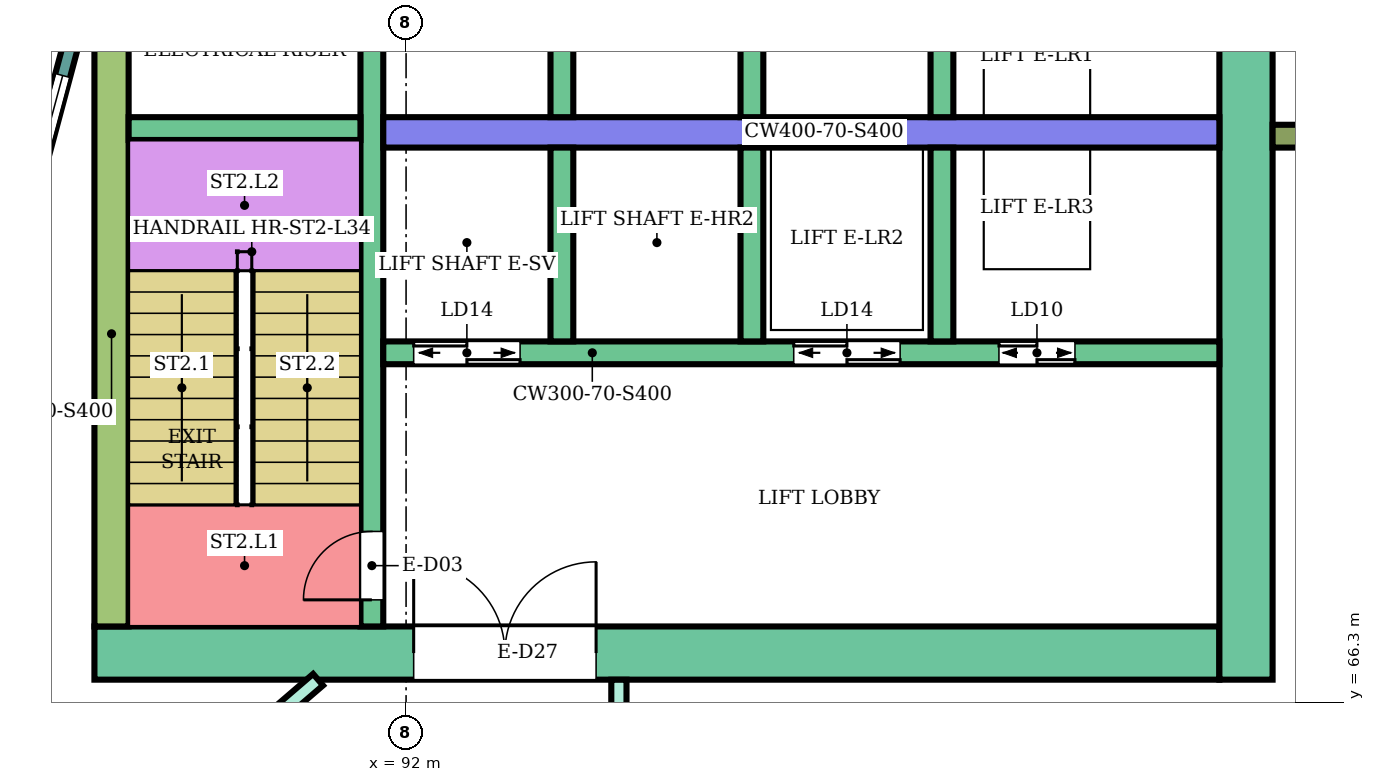
"""IFC4 building model, lengths in metres.
Left out: names, types, materials, properties, quantities, classifications, styles, units other than length and angle.
Written with IfcOpenShell. Run it as: python <this file> out.ifc"""

import sys

from ifc_helpers import new_model, si_unit, direction, frame, frame_2d, origin, place, context, subcontext, project, spatial, rectangle, extrude, element, fill, save


model = new_model("IFC4")
c1 = context("Model", 3, precision=1e-05, world=origin(), true_north=direction((0.0, 1.0)))
c2 = subcontext(c1, "Body", "Model", "MODEL_VIEW")
j1 = project(units=[si_unit("LENGTHUNIT", "METRE"), si_unit("PLANEANGLEUNIT", "RADIAN")], contexts=[c1])
p1 = place(None, origin())
s1 = spatial("IfcSite", under=j1, at=p1, CompositionType="ELEMENT")
p2 = place(p1, origin())
s2 = spatial("IfcBuilding", under=s1, at=p2, CompositionType="ELEMENT")
p3 = place(p2, frame((0.0, 0.0, 145.8)))
s3 = spatial("IfcBuildingStorey", under=s2, at=p3, CompositionType="ELEMENT", Elevation=145.8)
p4 = place(p3, frame((87.9, 66.95, 0.0), z_axis=(0.0, 0.0, 1.0), x_axis=(1.0, 0.0, 0.0)))
e1 = element("IfcWall", 1, at=p4, inside=s3, PredefinedType="SHEAR", context=c2, shape_type="SweptSolid", body=[
    extrude(rectangle(XDim=14.8, YDim=0.7, at=frame_2d((7.4, 0.0))), origin(), (0.0, 0.0, 1.0), 3.5),
])
p5 = place(p4, frame((4.2, 0.0, 0.0)))
e2 = element("IfcOpeningElement", 2, at=p5, cuts=e1, PredefinedType="OPENING", context=c2, shape_type="SweptSolid", body=[
    extrude(rectangle(XDim=2.4, YDim=2.4, at=frame_2d((1.2, 1.2))), frame((0.0, 0.36, 0.0), z_axis=(0.0, -1.0, 0.0), x_axis=(1.0, 0.0, 0.0)), (0.0, 0.0, 1.0), 0.72),
])
p6 = place(p3, frame((88.125, 67.3, 0.0), z_axis=(0.0, 0.0, 1.0), x_axis=(0.0, 1.0, 0.0)))
e3 = element("IfcWall", 3, at=p6, inside=s3, PredefinedType="SHEAR", context=c2, shape_type="SweptSolid", body=[
    extrude(rectangle(XDim=7.7, YDim=0.45, at=frame_2d((3.85, 0.0))), origin(), (0.0, 0.0, 1.0), 3.5),
])
p7 = place(p3, frame((103.05, 66.6, 0.0), z_axis=(0.0, 0.0, 1.0), x_axis=(0.0, 1.0, 0.0)))
e4 = element("IfcWall", 4, at=p7, inside=s3, PredefinedType="SHEAR", context=c2, shape_type="SweptSolid", body=[
    extrude(rectangle(XDim=16.8, YDim=0.7, at=frame_2d((8.4, 0.0))), origin(), (0.0, 0.0, 1.0), 3.5),
])
p8 = place(p3, frame((91.55, 67.3, 0.0), z_axis=(0.0, 0.0, 1.0), x_axis=(0.0, 1.0, 0.0)))
e5 = element("IfcWall", 5, at=p8, inside=s3, PredefinedType="SHEAR", context=c2, shape_type="SweptSolid", body=[
    extrude(rectangle(XDim=7.7, YDim=0.3, at=frame_2d((3.85, 0.0))), origin(), (0.0, 0.0, 1.0), 3.5),
])
p9 = place(p8, frame((0.35, 0.0, 0.0)))
e6 = element("IfcOpeningElement", 6, at=p9, cuts=e5, PredefinedType="OPENING", context=c2, shape_type="SweptSolid", body=[
    extrude(rectangle(XDim=0.9, YDim=2.1, at=frame_2d((0.45, 1.05))), frame((0.0, 0.16, 0.0), z_axis=(0.0, -1.0, 0.0), x_axis=(1.0, 0.0, 0.0)), (0.0, 0.0, 1.0), 0.32),
])
p10 = place(p3, frame((88.35, 73.85, 0.0), z_axis=(0.0, 0.0, 1.0), x_axis=(1.0, 0.0, 0.0)))
e7 = element("IfcWall", 7, at=p10, inside=s3, PredefinedType="SHEAR", context=c2, shape_type="SweptSolid", body=[
    extrude(rectangle(XDim=3.05, YDim=0.3, at=frame_2d((1.525, 0.0))), origin(), (0.0, 0.0, 1.0), 3.5),
])
p11 = place(p3, frame((91.7, 73.8, 0.0), z_axis=(0.0, 0.0, 1.0), x_axis=(1.0, 0.0, 0.0)))
e8 = element("IfcWall", 8, at=p11, inside=s3, PredefinedType="SHEAR", context=c2, shape_type="SweptSolid", body=[
    extrude(rectangle(XDim=11.0, YDim=0.4, at=frame_2d((5.5, 0.0))), origin(), (0.0, 0.0, 1.0), 3.5),
])
p12 = place(p3, frame((91.7, 70.9, 0.0), z_axis=(0.0, 0.0, 1.0), x_axis=(1.0, 0.0, 0.0)))
e9 = element("IfcWall", 9, at=p12, inside=s3, PredefinedType="SHEAR", context=c2, shape_type="SweptSolid", body=[
    extrude(rectangle(XDim=11.0, YDim=0.3, at=frame_2d((5.5, 0.0))), origin(), (0.0, 0.0, 1.0), 3.5),
])
p13 = place(p12, frame((0.4, 0.0, 0.0)))
e10 = element("IfcOpeningElement", 10, at=p13, cuts=e9, PredefinedType="OPENING", context=c2, shape_type="SweptSolid", body=[
    extrude(rectangle(XDim=1.4, YDim=2.1, at=frame_2d((0.7, 1.05))), frame((0.0, 0.16, 0.0), z_axis=(0.0, -1.0, 0.0), x_axis=(1.0, 0.0, 0.0)), (0.0, 0.0, 1.0), 0.32),
])
p14 = place(p12, frame((5.4, 0.0, 0.0)))
e11 = element("IfcOpeningElement", 11, at=p14, cuts=e9, PredefinedType="OPENING", context=c2, shape_type="SweptSolid", body=[
    extrude(rectangle(XDim=1.4, YDim=2.1, at=frame_2d((0.7, 1.05))), frame((0.0, 0.16, 0.0), z_axis=(0.0, -1.0, 0.0), x_axis=(1.0, 0.0, 0.0)), (0.0, 0.0, 1.0), 0.32),
])
p15 = place(p12, frame((8.1, 0.0, 0.0)))
e12 = element("IfcOpeningElement", 12, at=p15, cuts=e9, PredefinedType="OPENING", context=c2, shape_type="SweptSolid", body=[
    extrude(rectangle(XDim=1.0, YDim=2.1, at=frame_2d((0.5, 1.05))), frame((0.0, 0.16, 0.0), z_axis=(0.0, -1.0, 0.0), x_axis=(1.0, 0.0, 0.0)), (0.0, 0.0, 1.0), 0.32),
])
for number, where, z_axis, x_axis in (
    (13, (94.05, 74.0, 0.0), (0.0, 0.0, 1.0), (0.0, 1.0, 0.0)),
    (14, (96.55, 74.0, 0.0), (0.0, 0.0, 1.0), (0.0, 1.0, 0.0)),
    (15, (99.05, 74.0, 0.0), (0.0, 0.0, 1.0), (0.0, 1.0, 0.0)),
    (16, (94.05, 71.05, 0.0), (0.0, 0.0, 1.0), (0.0, 1.0, 0.0)),
    (17, (96.55, 71.05, 0.0), (0.0, 0.0, 1.0), (0.0, 1.0, 0.0)),
    (18, (99.05, 71.05, 0.0), (0.0, 0.0, 1.0), (0.0, 1.0, 0.0)),
):
    element("IfcWall", number, at=place(p3, frame(where, z_axis=z_axis, x_axis=x_axis)), inside=s3, PredefinedType="SHEAR", context=c2, shape_type="SweptSolid", body=[
        extrude(rectangle(XDim=2.55, YDim=0.3, at=frame_2d((1.275, 0.0))), origin(), (0.0, 0.0, 1.0), 3.5),
    ])
p16 = place(p3, frame((103.4, 73.75, 0.0), z_axis=(0.0, 0.0, 1.0), x_axis=(1.0, 0.0, 0.0)))
e19 = element("IfcWall", 19, at=p16, inside=s3, PredefinedType="NOTDEFINED", context=c2, shape_type="SweptSolid", body=[
    extrude(rectangle(XDim=2.416, YDim=0.3, at=frame_2d((1.208, 0.0))), origin(), (0.0, 0.0, 1.0), 3.9),
])
p17 = place(p3, frame((86.585, 71.198, 0.0), z_axis=(0.0, 0.0, 1.0), x_axis=(0.258789828301, 0.965933654434, 0.0)))
e20 = element("IfcWall", 20, at=p17, inside=s3, PredefinedType="NOTDEFINED", context=c2, shape_type="SweptSolid", body=[
    extrude(rectangle(XDim=3.936, YDim=0.2, at=frame_2d((1.968, 0.0))), origin(), (0.0, 0.0, 1.0), 3.9),
])
p18 = place(p17, frame((0.468, 0.0, 0.9)))
e21 = element("IfcOpeningElement", 21, at=p18, cuts=e20, PredefinedType="OPENING", context=c2, shape_type="SweptSolid", body=[
    extrude(rectangle(XDim=3.0, YDim=2.3, at=frame_2d((1.5, 1.15))), frame((0.0, 0.11, 0.0), z_axis=(0.0, -1.0, 0.0), x_axis=(1.0, 0.0, 0.0)), (0.0, 0.0, 1.0), 0.22),
])
p19 = place(p3, frame((86.877, 63.189, 0.0), z_axis=(0.0, 0.0, 1.0), x_axis=(0.758164888471, 0.652062881853, 0.0)))
e22 = element("IfcWall", 22, at=p19, inside=s3, PredefinedType="PARTITIONING", context=c2, shape_type="SweptSolid", body=[
    extrude(rectangle(XDim=5.23, YDim=0.2, at=frame_2d((2.615, 0.0))), origin(), (0.0, 0.0, 1.0), 3.45),
])
p20 = place(p19, frame((2.63, 0.0, 0.0)))
e23 = element("IfcOpeningElement", 23, at=p20, cuts=e22, PredefinedType="OPENING", context=c2, shape_type="SweptSolid", body=[
    extrude(rectangle(XDim=1.0, YDim=2.1, at=frame_2d((0.5, 1.05))), frame((0.0, 0.11, 0.0), z_axis=(0.0, -1.0, 0.0), x_axis=(1.0, 0.0, 0.0)), (0.0, 0.0, 1.0), 0.22),
])
p21 = place(p3, frame((94.8, 65.1, 0.0), z_axis=(0.0, 0.0, 1.0), x_axis=(0.0, 1.0, 0.0)))
e24 = element("IfcWall", 24, at=p21, inside=s3, PredefinedType="PARTITIONING", context=c2, shape_type="SweptSolid", body=[
    extrude(rectangle(XDim=1.499, YDim=0.2, at=frame_2d((0.75, 0.0))), origin(), (0.0, 0.0, 1.0), 3.45),
])
p22 = place(p3, frame((86.643, 66.681, 0.0), z_axis=(0.0, 0.0, 1.0), x_axis=(0.652264876065, -0.757991115682, 0.0)))
e25 = element("IfcWall", 25, at=p22, inside=s3, PredefinedType="PARTITIONING", context=c2, shape_type="SweptSolid", body=[
    extrude(rectangle(XDim=2.699, YDim=0.1, at=frame_2d((1.35, 0.0))), origin(), (0.0, 0.0, 1.0), 3.45),
])
p23 = place(p22, frame((1.3, 0.0, 0.0)))
e26 = element("IfcOpeningElement", 26, at=p23, cuts=e25, PredefinedType="OPENING", context=c2, shape_type="SweptSolid", body=[
    extrude(rectangle(XDim=0.8, YDim=2.1, at=frame_2d((0.4, 1.05))), frame((0.0, 0.06, 0.0), z_axis=(0.0, -1.0, 0.0), x_axis=(1.0, 0.0, 0.0)), (0.0, 0.0, 1.0), 0.12),
])
p24 = place(p18, origin())
e27 = element("IfcWindow", 27, at=p24, inside=s3, PartitioningType="SINGLE_PANEL", PredefinedType="WINDOW", context=c2, shape_type="SweptSolid", body=[
    extrude(rectangle(XDim=3.0, YDim=2.3, at=frame_2d((1.5, 1.15))), frame((0.0, 0.03, 0.0), z_axis=(0.0, -1.0, 0.0), x_axis=(1.0, 0.0, 0.0)), (0.0, 0.0, 1.0), 0.06),
])
fill(e21, e27)
p25 = place(p9, origin())
e28 = element("IfcDoor", 28, at=p25, inside=s3, OperationType="SINGLE_SWING_LEFT", PredefinedType="DOOR", context=c2, shape_type="SweptSolid", body=[
    extrude(rectangle(XDim=0.9, YDim=2.1, at=frame_2d((0.45, 1.05))), frame((0.0, 0.025, 0.0), z_axis=(0.0, -1.0, 0.0), x_axis=(1.0, 0.0, 0.0)), (0.0, 0.0, 1.0), 0.05),
])
fill(e6, e28)
p26 = place(p13, origin())
e29 = element("IfcDoor", 29, at=p26, inside=s3, OperationType="DOUBLE_DOOR_SLIDING", PredefinedType="DOOR", context=c2, shape_type="SweptSolid", body=[
    extrude(rectangle(XDim=1.4, YDim=2.1, at=frame_2d((0.7, 1.05))), frame((0.0, 0.025, 0.0), z_axis=(0.0, -1.0, 0.0), x_axis=(1.0, 0.0, 0.0)), (0.0, 0.0, 1.0), 0.05),
])
fill(e10, e29)
p27 = place(p14, origin())
e30 = element("IfcDoor", 30, at=p27, inside=s3, OperationType="DOUBLE_DOOR_SLIDING", PredefinedType="DOOR", context=c2, shape_type="SweptSolid", body=[
    extrude(rectangle(XDim=1.4, YDim=2.1, at=frame_2d((0.7, 1.05))), frame((0.0, 0.025, 0.0), z_axis=(0.0, -1.0, 0.0), x_axis=(1.0, 0.0, 0.0)), (0.0, 0.0, 1.0), 0.05),
])
fill(e11, e30)
p28 = place(p15, origin())
e31 = element("IfcDoor", 31, at=p28, inside=s3, OperationType="DOUBLE_DOOR_SLIDING", PredefinedType="DOOR", context=c2, shape_type="SweptSolid", body=[
    extrude(rectangle(XDim=1.0, YDim=2.1, at=frame_2d((0.5, 1.05))), frame((0.0, 0.025, 0.0), z_axis=(0.0, -1.0, 0.0), x_axis=(1.0, 0.0, 0.0)), (0.0, 0.0, 1.0), 0.05),
])
fill(e12, e31)
p29 = place(p5, origin())
e32 = element("IfcDoor", 32, at=p29, inside=s3, OperationType="DOUBLE_DOOR_SINGLE_SWING", PredefinedType="DOOR", context=c2, shape_type="SweptSolid", body=[
    extrude(rectangle(XDim=2.4, YDim=2.4, at=frame_2d((1.2, 1.2))), frame((0.0, 0.025, 0.0), z_axis=(0.0, -1.0, 0.0), x_axis=(1.0, 0.0, 0.0)), (0.0, 0.0, 1.0), 0.05),
])
fill(e2, e32)
save(model, sys.argv[1])
